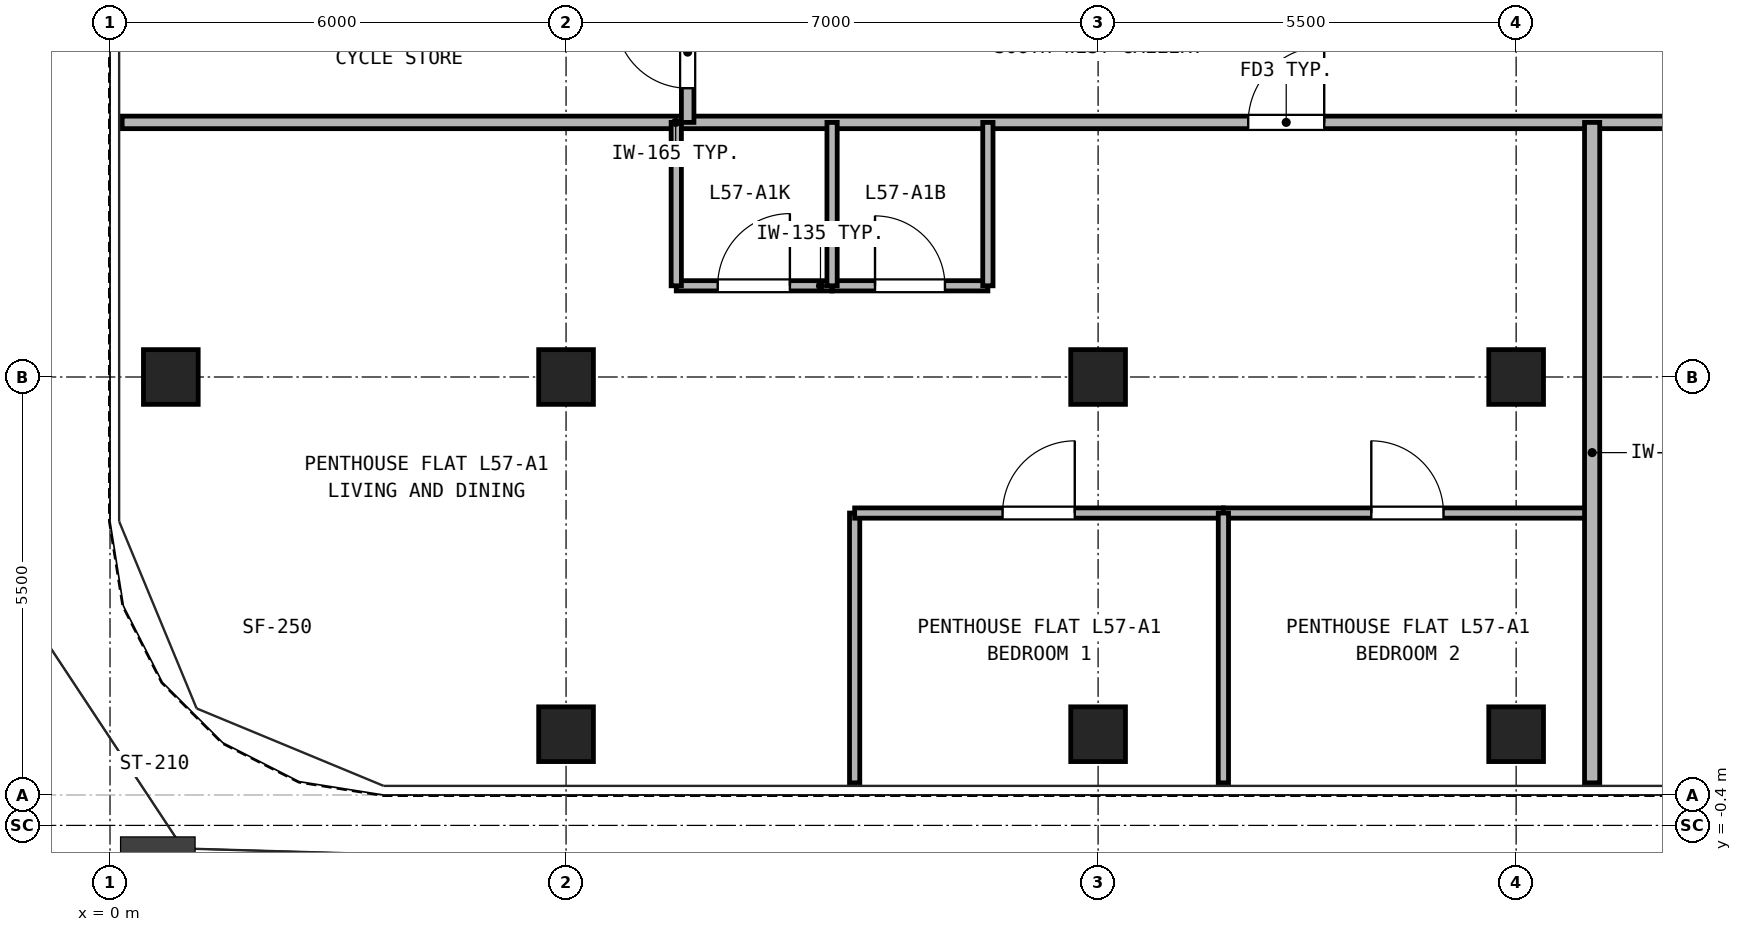
"""IFC4 building model, lengths in metres.
Left out: names, types, materials, properties, quantities, classifications, styles, units other than length and angle.
Written with IfcOpenShell. Run it as: python <this file> out.ifc"""

import sys

from ifc_helpers import new_model, si_unit, direction, frame, frame_2d, origin, origin_2d, place, context, subcontext, project, spatial, rectangle, hollow_rectangle, extrude, source, transform, mapped, element, fill, save


model = new_model("IFC4")
c1 = context("Model", 3, precision=1e-05, world=origin(), true_north=direction((0.0, 1.0)))
c2 = subcontext(c1, "Body", "Model", "MODEL_VIEW")
j1 = project(units=[si_unit("LENGTHUNIT", "METRE"), si_unit("PLANEANGLEUNIT", "RADIAN")], contexts=[c1])
p1 = place(None, origin())
s1 = spatial("IfcSite", under=j1, at=p1, CompositionType="ELEMENT")
p2 = place(p1, origin())
s2 = spatial("IfcBuilding", under=s1, at=p2, CompositionType="ELEMENT")
p3 = place(p2, frame((0.0, 0.0, 202.8)))
s3 = spatial("IfcBuildingStorey", under=s2, at=p3, CompositionType="ELEMENT", Elevation=202.8)
m1 = source(origin(), c2, "Body", "SweptSolid", [
    extrude(hollow_rectangle(XDim=0.72, YDim=0.72, WallThickness=0.04, at=origin_2d()), origin(), (0.0, 0.0, 1.0), 2.95),
])
for number, where, z_axis, x_axis in (
    (1, (6.0, 0.8, 0.0), (0.0, 0.0, 1.0), (1.0, 0.0, 0.0)),
    (2, (13.0, 0.8, 0.0), (0.0, 0.0, 1.0), (1.0, 0.0, 0.0)),
    (3, (18.5, 0.8, 0.0), (0.0, 0.0, 1.0), (1.0, 0.0, 0.0)),
    (4, (0.8, 5.5, 0.0), (0.0, 0.0, 1.0), (1.0, 0.0, 0.0)),
    (5, (6.0, 5.5, 0.0), (0.0, 0.0, 1.0), (1.0, 0.0, 0.0)),
    (6, (13.0, 5.5, 0.0), (0.0, 0.0, 1.0), (1.0, 0.0, 0.0)),
    (7, (18.5, 5.5, 0.0), (0.0, 0.0, 1.0), (1.0, 0.0, 0.0)),
):
    element("IfcColumn", number, at=place(p3, frame(where, z_axis=z_axis, x_axis=x_axis)), inside=s3, PredefinedType="COLUMN", context=c2, shape_type="MappedRepresentation", body=[
        mapped(m1, transform((0.0, 0.0, 0.0), x_axis=(1.0, 0.0, 0.0), y_axis=(0.0, 1.0, 0.0), z_axis=(0.0, 0.0, 1.0), scale=1.0)),
    ])
p4 = place(p3, frame((0.16, 8.85, 0.0), z_axis=(0.0, 0.0, 1.0), x_axis=(1.0, 0.0, 0.0)))
e8 = element("IfcWall", 8, at=p4, inside=s3, PredefinedType="PARTITIONING", context=c2, shape_type="SweptSolid", body=[
    extrude(rectangle(XDim=41.48, YDim=0.165, at=frame_2d((20.74, 0.0))), origin(), (0.0, 0.0, 1.0), 2.95),
])
p5 = place(p4, frame((14.815, 0.0, 0.0)))
e9 = element("IfcOpeningElement", 9, at=p5, cuts=e8, PredefinedType="OPENING", context=c2, shape_type="SweptSolid", body=[
    extrude(rectangle(XDim=1.0, YDim=2.15, at=frame_2d((0.5, 1.075))), frame((0.0, 0.093, 0.0), z_axis=(0.0, -1.0, 0.0), x_axis=(1.0, 0.0, 0.0)), (0.0, 0.0, 1.0), 0.185),
])
p6 = place(p4, frame((28.315, 0.0, 0.0)))
e10 = element("IfcOpeningElement", 10, at=p6, cuts=e8, PredefinedType="OPENING", context=c2, shape_type="SweptSolid", body=[
    extrude(rectangle(XDim=1.0, YDim=2.15, at=frame_2d((0.5, 1.075))), frame((0.0, 0.093, 0.0), z_axis=(0.0, -1.0, 0.0), x_axis=(1.0, 0.0, 0.0)), (0.0, 0.0, 1.0), 0.185),
])
p7 = place(p4, frame((32.615, 0.0, 0.0)))
e11 = element("IfcOpeningElement", 11, at=p7, cuts=e8, PredefinedType="OPENING", context=c2, shape_type="SweptSolid", body=[
    extrude(rectangle(XDim=1.0, YDim=2.15, at=frame_2d((0.5, 1.075))), frame((0.0, 0.093, 0.0), z_axis=(0.0, -1.0, 0.0), x_axis=(1.0, 0.0, 0.0)), (0.0, 0.0, 1.0), 0.185),
])
p8 = place(p3, frame((7.6, 8.85, 0.0), z_axis=(0.0, 0.0, 1.0), x_axis=(0.0, 1.0, 0.0)))
e12 = element("IfcWall", 12, at=p8, inside=s3, PredefinedType="PARTITIONING", context=c2, shape_type="SweptSolid", body=[
    extrude(rectangle(XDim=2.0, YDim=0.165, at=frame_2d((1.0, 0.0))), origin(), (0.0, 0.0, 1.0), 2.95),
])
p9 = place(p8, frame((0.45, 0.0, 0.0)))
e13 = element("IfcOpeningElement", 13, at=p9, cuts=e12, PredefinedType="OPENING", context=c2, shape_type="SweptSolid", body=[
    extrude(rectangle(XDim=0.95, YDim=2.15, at=frame_2d((0.475, 1.075))), frame((0.0, 0.093, 0.0), z_axis=(0.0, -1.0, 0.0), x_axis=(1.0, 0.0, 0.0)), (0.0, 0.0, 1.0), 0.185),
])
p10 = place(p3, frame((7.45, 6.7, 0.0), z_axis=(0.0, 0.0, 1.0), x_axis=(1.0, 0.0, 0.0)))
e14 = element("IfcWall", 14, at=p10, inside=s3, PredefinedType="PARTITIONING", context=c2, shape_type="SweptSolid", body=[
    extrude(rectangle(XDim=2.05, YDim=0.135, at=frame_2d((1.025, 0.0))), origin(), (0.0, 0.0, 1.0), 2.95),
])
p11 = place(p10, frame((0.545, 0.0, 0.0)))
e15 = element("IfcOpeningElement", 15, at=p11, cuts=e14, PredefinedType="OPENING", context=c2, shape_type="SweptSolid", body=[
    extrude(rectangle(XDim=0.95, YDim=2.15, at=frame_2d((0.475, 1.075))), frame((0.0, 0.077, 0.0), z_axis=(0.0, -1.0, 0.0), x_axis=(1.0, 0.0, 0.0)), (0.0, 0.0, 1.0), 0.155),
])
p12 = place(p3, frame((9.5, 6.7, 0.0), z_axis=(0.0, 0.0, 1.0), x_axis=(1.0, 0.0, 0.0)))
e16 = element("IfcWall", 16, at=p12, inside=s3, PredefinedType="PARTITIONING", context=c2, shape_type="SweptSolid", body=[
    extrude(rectangle(XDim=2.05, YDim=0.135, at=frame_2d((1.025, 0.0))), origin(), (0.0, 0.0, 1.0), 2.95),
])
p13 = place(p12, frame((0.565, 0.0, 0.0)))
e17 = element("IfcOpeningElement", 17, at=p13, cuts=e16, PredefinedType="OPENING", context=c2, shape_type="SweptSolid", body=[
    extrude(rectangle(XDim=0.92, YDim=2.1, at=frame_2d((0.46, 1.05))), frame((0.0, 0.077, 0.0), z_axis=(0.0, -1.0, 0.0), x_axis=(1.0, 0.0, 0.0)), (0.0, 0.0, 1.0), 0.155),
])
for number, where, z_axis, x_axis in (
    (18, (7.45, 6.7, 0.0), (0.0, 0.0, 1.0), (0.0, 1.0, 0.0)),
    (19, (9.5, 6.7, 0.0), (0.0, 0.0, 1.0), (0.0, 1.0, 0.0)),
    (20, (11.55, 6.7, 0.0), (0.0, 0.0, 1.0), (0.0, 1.0, 0.0)),
):
    element("IfcWall", number, at=place(p3, frame(where, z_axis=z_axis, x_axis=x_axis)), inside=s3, PredefinedType="PARTITIONING", context=c2, shape_type="SweptSolid", body=[
        extrude(rectangle(XDim=2.15, YDim=0.135, at=frame_2d((1.075, 0.0))), origin(), (0.0, 0.0, 1.0), 2.95),
    ])
p14 = place(p3, frame((9.797, 0.16, 0.0), z_axis=(0.0, 0.0, 1.0), x_axis=(0.0, 1.0, 0.0)))
e21 = element("IfcWall", 21, at=p14, inside=s3, PredefinedType="PARTITIONING", context=c2, shape_type="SweptSolid", body=[
    extrude(rectangle(XDim=3.55, YDim=0.135, at=frame_2d((1.775, 0.0))), origin(), (0.0, 0.0, 1.0), 2.95),
])
p15 = place(p3, frame((9.797, 3.71, 0.0), z_axis=(0.0, 0.0, 1.0), x_axis=(1.0, 0.0, 0.0)))
e22 = element("IfcWall", 22, at=p15, inside=s3, PredefinedType="PARTITIONING", context=c2, shape_type="SweptSolid", body=[
    extrude(rectangle(XDim=4.851, YDim=0.135, at=frame_2d((2.426, 0.0))), origin(), (0.0, 0.0, 1.0), 2.95),
])
p16 = place(p15, frame((1.946, 0.0, 0.0)))
e23 = element("IfcOpeningElement", 23, at=p16, cuts=e22, PredefinedType="OPENING", context=c2, shape_type="SweptSolid", body=[
    extrude(rectangle(XDim=0.95, YDim=2.15, at=frame_2d((0.475, 1.075))), frame((0.0, 0.077, 0.0), z_axis=(0.0, -1.0, 0.0), x_axis=(1.0, 0.0, 0.0)), (0.0, 0.0, 1.0), 0.155),
])
p17 = place(p3, frame((14.648, 3.71, 0.0), z_axis=(0.0, 0.0, 1.0), x_axis=(1.0, 0.0, 0.0)))
e24 = element("IfcWall", 24, at=p17, inside=s3, PredefinedType="PARTITIONING", context=c2, shape_type="SweptSolid", body=[
    extrude(rectangle(XDim=4.852, YDim=0.135, at=frame_2d((2.426, 0.0))), origin(), (0.0, 0.0, 1.0), 2.95),
])
p18 = place(p17, frame((1.946, 0.0, 0.0)))
e25 = element("IfcOpeningElement", 25, at=p18, cuts=e24, PredefinedType="OPENING", context=c2, shape_type="SweptSolid", body=[
    extrude(rectangle(XDim=0.95, YDim=2.15, at=frame_2d((0.475, 1.075))), frame((0.0, 0.077, 0.0), z_axis=(0.0, -1.0, 0.0), x_axis=(1.0, 0.0, 0.0)), (0.0, 0.0, 1.0), 0.155),
])
p19 = place(p3, frame((14.648, 0.16, 0.0), z_axis=(0.0, 0.0, 1.0), x_axis=(0.0, 1.0, 0.0)))
e26 = element("IfcWall", 26, at=p19, inside=s3, PredefinedType="PARTITIONING", context=c2, shape_type="SweptSolid", body=[
    extrude(rectangle(XDim=3.55, YDim=0.135, at=frame_2d((1.775, 0.0))), origin(), (0.0, 0.0, 1.0), 2.95),
])
p20 = place(p3, frame((19.5, 0.16, 0.0), z_axis=(0.0, 0.0, 1.0), x_axis=(0.0, 1.0, 0.0)))
e27 = element("IfcWall", 27, at=p20, inside=s3, PredefinedType="PARTITIONING", context=c2, shape_type="SweptSolid", body=[
    extrude(rectangle(XDim=8.69, YDim=0.2, at=frame_2d((4.345, 0.0))), origin(), (0.0, 0.0, 1.0), 2.95),
])
p21 = place(p11, origin())
e28 = element("IfcDoor", 28, at=p21, inside=s3, OperationType="SINGLE_SWING_RIGHT", PredefinedType="DOOR", context=c2, shape_type="SweptSolid", body=[
    extrude(rectangle(XDim=0.95, YDim=2.15, at=frame_2d((0.475, 1.075))), frame((0.0, 0.025, 0.0), z_axis=(0.0, -1.0, 0.0), x_axis=(1.0, 0.0, 0.0)), (0.0, 0.0, 1.0), 0.05),
])
fill(e15, e28)
p22 = place(p13, origin())
e29 = element("IfcDoor", 29, at=p22, inside=s3, OperationType="SINGLE_SWING_LEFT", PredefinedType="DOOR", context=c2, shape_type="SweptSolid", body=[
    extrude(rectangle(XDim=0.92, YDim=2.1, at=frame_2d((0.46, 1.05))), frame((0.0, 0.025, 0.0), z_axis=(0.0, -1.0, 0.0), x_axis=(1.0, 0.0, 0.0)), (0.0, 0.0, 1.0), 0.05),
])
fill(e17, e29)
p23 = place(p16, frame((0.95, 0.0, 0.0), z_axis=(0.0, 0.0, 1.0), x_axis=(-1.0, 0.0, 0.0)))
e30 = element("IfcDoor", 30, at=p23, inside=s3, OperationType="SINGLE_SWING_RIGHT", PredefinedType="DOOR", context=c2, shape_type="SweptSolid", body=[
    extrude(rectangle(XDim=0.95, YDim=2.15, at=frame_2d((0.475, 1.075))), frame((0.0, 0.025, 0.0), z_axis=(0.0, -1.0, 0.0), x_axis=(1.0, 0.0, 0.0)), (0.0, 0.0, 1.0), 0.05),
])
fill(e23, e30)
p24 = place(p18, frame((0.95, 0.0, 0.0), z_axis=(0.0, 0.0, 1.0), x_axis=(-1.0, 0.0, 0.0)))
e31 = element("IfcDoor", 31, at=p24, inside=s3, OperationType="SINGLE_SWING_LEFT", PredefinedType="DOOR", context=c2, shape_type="SweptSolid", body=[
    extrude(rectangle(XDim=0.95, YDim=2.15, at=frame_2d((0.475, 1.075))), frame((0.0, 0.025, 0.0), z_axis=(0.0, -1.0, 0.0), x_axis=(1.0, 0.0, 0.0)), (0.0, 0.0, 1.0), 0.05),
])
fill(e25, e31)
p25 = place(p5, frame((1.0, 0.0, 0.0), z_axis=(0.0, 0.0, 1.0), x_axis=(-1.0, 0.0, 0.0)))
e32 = element("IfcDoor", 32, at=p25, inside=s3, OperationType="SINGLE_SWING_RIGHT", PredefinedType="DOOR", context=c2, shape_type="SweptSolid", body=[
    extrude(rectangle(XDim=1.0, YDim=2.15, at=frame_2d((0.5, 1.075))), frame((0.0, 0.025, 0.0), z_axis=(0.0, -1.0, 0.0), x_axis=(1.0, 0.0, 0.0)), (0.0, 0.0, 1.0), 0.05),
])
fill(e9, e32)
p26 = place(p9, frame((0.95, 0.0, 0.0), z_axis=(0.0, 0.0, 1.0), x_axis=(-1.0, 0.0, 0.0)))
e33 = element("IfcDoor", 33, at=p26, inside=s3, OperationType="SINGLE_SWING_RIGHT", PredefinedType="DOOR", context=c2, shape_type="SweptSolid", body=[
    extrude(rectangle(XDim=0.95, YDim=2.15, at=frame_2d((0.475, 1.075))), frame((0.0, 0.025, 0.0), z_axis=(0.0, -1.0, 0.0), x_axis=(1.0, 0.0, 0.0)), (0.0, 0.0, 1.0), 0.05),
])
fill(e13, e33)
save(model, sys.argv[1])
